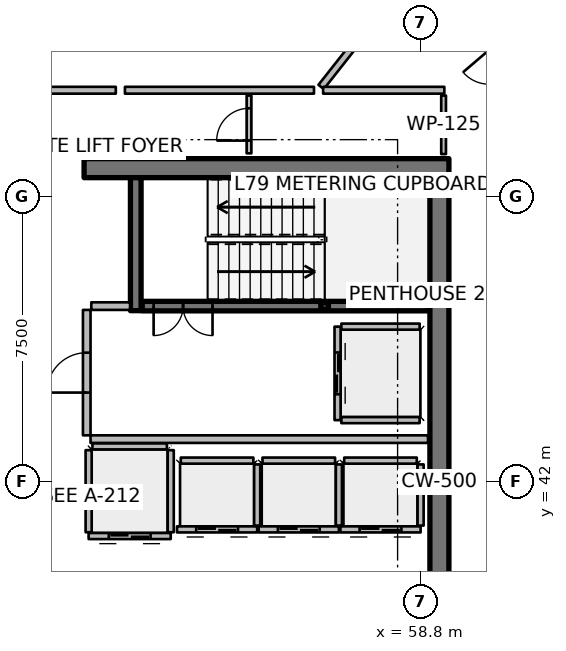
"""IFC4 building model, lengths in metres.
Left out: names, types, materials, properties, quantities, classifications, styles, units other than length and angle.
Written with IfcOpenShell. Run it as: python <this file> out.ifc"""

import sys

from ifc_helpers import new_model, si_unit, direction, frame, frame_2d, origin, origin_2d, place, context, subcontext, project, spatial, rectangle, hollow_rectangle, extrude, element, fill, save


model = new_model("IFC4")
c1 = context("Model", 3, precision=1e-05, world=origin(), true_north=direction((0.0, 1.0)))
c2 = subcontext(c1, "Body", "Model", "MODEL_VIEW")
j1 = project(units=[si_unit("LENGTHUNIT", "METRE"), si_unit("PLANEANGLEUNIT", "RADIAN")], contexts=[c1])
p1 = place(None, origin())
s1 = spatial("IfcSite", under=j1, at=p1, CompositionType="ELEMENT")
p2 = place(p1, origin())
s2 = spatial("IfcBuilding", under=s1, at=p2, CompositionType="ELEMENT")
p3 = place(p2, frame((0.0, 0.0, 313.7)))
s3 = spatial("IfcBuildingStorey", under=s2, at=p3, CompositionType="ELEMENT", Elevation=313.7)
p4 = place(p3, frame((49.95, 50.25, 0.0), z_axis=(0.0, 0.0, 1.0), x_axis=(1.0, 0.0, 0.0)))
e1 = element("IfcWall", 1, at=p4, inside=s3, PredefinedType="SHEAR", context=c2, shape_type="SweptSolid", body=[
    extrude(rectangle(XDim=9.6, YDim=0.5, at=frame_2d((4.8, 0.0))), origin(), (0.0, 0.0, 1.0), 4.2),
])
p5 = place(p3, frame((59.3, 34.0, 0.0), z_axis=(0.0, 0.0, 1.0), x_axis=(0.0, 1.0, 0.0)))
e2 = element("IfcWall", 2, at=p5, inside=s3, PredefinedType="SHEAR", context=c2, shape_type="SweptSolid", body=[
    extrude(rectangle(XDim=16.0, YDim=0.5, at=frame_2d((8.0, 0.0))), origin(), (0.0, 0.0, 1.0), 4.2),
])
p6 = place(p3, frame((51.31, 46.5, 0.0), z_axis=(0.0, 0.0, 1.0), x_axis=(0.0, 1.0, 0.0)))
e3 = element("IfcWall", 3, at=p6, inside=s3, PredefinedType="SHEAR", context=c2, shape_type="SweptSolid", body=[
    extrude(rectangle(XDim=3.5, YDim=0.28, at=frame_2d((1.75, 0.0))), origin(), (0.0, 0.0, 1.0), 4.2),
])
p7 = place(p3, frame((56.28, 46.62, 0.0), z_axis=(0.0, 0.0, 1.0), x_axis=(1.0, 0.0, 0.0)))
e4 = element("IfcColumn", 4, at=p7, inside=s3, PredefinedType="COLUMN", context=c2, shape_type="SweptSolid", body=[
    extrude(hollow_rectangle(XDim=0.2, YDim=0.2, WallThickness=0.01, InnerFilletRadius=0.01, OuterFilletRadius=0.02, at=origin_2d()), origin(), (0.0, 0.0, 1.0), 1.895),
])
p8 = place(p3, frame((51.48, 46.62, 0.0), z_axis=(0.0, 0.0, 1.0), x_axis=(1.0, 0.0, 0.0)))
e5 = element("IfcWall", 5, at=p8, inside=s3, PredefinedType="SOLIDWALL", context=c2, shape_type="SweptSolid", body=[
    extrude(rectangle(XDim=7.54, YDim=0.25, at=frame_2d((3.77, 0.0))), origin(), (0.0, 0.0, 1.0), 3.94),
])
p9 = place(p8, frame((0.3, 0.0, 0.0)))
e6 = element("IfcOpeningElement", 6, at=p9, cuts=e5, PredefinedType="OPENING", context=c2, shape_type="SweptSolid", body=[
    extrude(rectangle(XDim=1.55, YDim=2.15, at=frame_2d((0.775, 1.075))), frame((0.0, 0.135, 0.0), z_axis=(0.0, -1.0, 0.0), x_axis=(1.0, 0.0, 0.0)), (0.0, 0.0, 1.0), 0.27),
])
p10 = place(p3, frame((54.505, 40.745, 0.0), z_axis=(0.0, 0.0, 1.0), x_axis=(-1.0, 0.0, 0.0)))
e7 = element("IfcWall", 7, at=p10, inside=s3, PredefinedType="PARTITIONING", context=c2, shape_type="SweptSolid", body=[
    extrude(rectangle(XDim=2.11, YDim=0.16, at=frame_2d((1.055, 0.0))), origin(), (0.0, 0.0, 1.0), 3.94),
])
p11 = place(p10, frame((0.505, 0.0, 0.0)))
e8 = element("IfcOpeningElement", 8, at=p11, cuts=e7, PredefinedType="OPENING", context=c2, shape_type="SweptSolid", body=[
    extrude(rectangle(XDim=1.1, YDim=2.1, at=frame_2d((0.55, 1.05))), frame((0.0, 0.09, 0.0), z_axis=(0.0, -1.0, 0.0), x_axis=(1.0, 0.0, 0.0)), (0.0, 0.0, 1.0), 0.18),
])
p12 = place(p3, frame((54.505, 40.845, 0.0), z_axis=(0.0, 0.0, 1.0), x_axis=(0.0, 1.0, 0.0)))
e9 = element("IfcWall", 9, at=p12, inside=s3, PredefinedType="PARTITIONING", context=c2, shape_type="SweptSolid", body=[
    extrude(rectangle(XDim=1.61, YDim=0.16, at=frame_2d((0.805, 0.0))), origin(), (0.0, 0.0, 1.0), 3.94),
])
p13 = place(p3, frame((52.495, 42.555, 0.0), z_axis=(0.0, 0.0, 1.0), x_axis=(1.0, 0.0, 0.0)))
e10 = element("IfcWall", 10, at=p13, inside=s3, PredefinedType="PARTITIONING", context=c2, shape_type="SweptSolid", body=[
    extrude(rectangle(XDim=1.91, YDim=0.16, at=frame_2d((0.955, 0.0))), origin(), (0.0, 0.0, 1.0), 3.94),
])
p14 = place(p3, frame((56.655, 40.745, 0.0), z_axis=(0.0, 0.0, 1.0), x_axis=(-1.0, 0.0, 0.0)))
e11 = element("IfcWall", 11, at=p14, inside=s3, PredefinedType="PARTITIONING", context=c2, shape_type="SweptSolid", body=[
    extrude(rectangle(XDim=2.11, YDim=0.16, at=frame_2d((1.055, 0.0))), origin(), (0.0, 0.0, 1.0), 3.94),
])
p15 = place(p14, frame((0.505, 0.0, 0.0)))
e12 = element("IfcOpeningElement", 12, at=p15, cuts=e11, PredefinedType="OPENING", context=c2, shape_type="SweptSolid", body=[
    extrude(rectangle(XDim=1.1, YDim=2.1, at=frame_2d((0.55, 1.05))), frame((0.0, 0.09, 0.0), z_axis=(0.0, -1.0, 0.0), x_axis=(1.0, 0.0, 0.0)), (0.0, 0.0, 1.0), 0.18),
])
p16 = place(p3, frame((56.655, 40.845, 0.0), z_axis=(0.0, 0.0, 1.0), x_axis=(0.0, 1.0, 0.0)))
e13 = element("IfcWall", 13, at=p16, inside=s3, PredefinedType="PARTITIONING", context=c2, shape_type="SweptSolid", body=[
    extrude(rectangle(XDim=1.61, YDim=0.16, at=frame_2d((0.805, 0.0))), origin(), (0.0, 0.0, 1.0), 3.94),
])
p17 = place(p3, frame((54.645, 42.555, 0.0), z_axis=(0.0, 0.0, 1.0), x_axis=(1.0, 0.0, 0.0)))
e14 = element("IfcWall", 14, at=p17, inside=s3, PredefinedType="PARTITIONING", context=c2, shape_type="SweptSolid", body=[
    extrude(rectangle(XDim=1.91, YDim=0.16, at=frame_2d((0.955, 0.0))), origin(), (0.0, 0.0, 1.0), 3.94),
])
p18 = place(p3, frame((58.805, 40.745, 0.0), z_axis=(0.0, 0.0, 1.0), x_axis=(-1.0, 0.0, 0.0)))
e15 = element("IfcWall", 15, at=p18, inside=s3, PredefinedType="PARTITIONING", context=c2, shape_type="SweptSolid", body=[
    extrude(rectangle(XDim=2.11, YDim=0.16, at=frame_2d((1.055, 0.0))), origin(), (0.0, 0.0, 1.0), 3.94),
])
p19 = place(p18, frame((0.505, 0.0, 0.0)))
e16 = element("IfcOpeningElement", 16, at=p19, cuts=e15, PredefinedType="OPENING", context=c2, shape_type="SweptSolid", body=[
    extrude(rectangle(XDim=1.1, YDim=2.1, at=frame_2d((0.55, 1.05))), frame((0.0, 0.09, 0.0), z_axis=(0.0, -1.0, 0.0), x_axis=(1.0, 0.0, 0.0)), (0.0, 0.0, 1.0), 0.18),
])
p20 = place(p3, frame((58.805, 40.845, 0.0), z_axis=(0.0, 0.0, 1.0), x_axis=(0.0, 1.0, 0.0)))
e17 = element("IfcWall", 17, at=p20, inside=s3, PredefinedType="PARTITIONING", context=c2, shape_type="SweptSolid", body=[
    extrude(rectangle(XDim=1.61, YDim=0.16, at=frame_2d((0.805, 0.0))), origin(), (0.0, 0.0, 1.0), 3.94),
])
p21 = place(p3, frame((56.795, 42.555, 0.0), z_axis=(0.0, 0.0, 1.0), x_axis=(1.0, 0.0, 0.0)))
e18 = element("IfcWall", 18, at=p21, inside=s3, PredefinedType="PARTITIONING", context=c2, shape_type="SweptSolid", body=[
    extrude(rectangle(XDim=1.91, YDim=0.16, at=frame_2d((0.955, 0.0))), origin(), (0.0, 0.0, 1.0), 3.94),
])
p22 = place(p3, frame((56.62, 46.08, 0.0), z_axis=(0.0, 0.0, 1.0), x_axis=(0.0, -1.0, 0.0)))
e19 = element("IfcWall", 19, at=p22, inside=s3, PredefinedType="PARTITIONING", context=c2, shape_type="SweptSolid", body=[
    extrude(rectangle(XDim=2.46, YDim=0.16, at=frame_2d((1.23, 0.0))), origin(), (0.0, 0.0, 1.0), 3.94),
])
p23 = place(p22, frame((0.68, 0.0, 0.0)))
e20 = element("IfcOpeningElement", 20, at=p23, cuts=e19, PredefinedType="OPENING", context=c2, shape_type="SweptSolid", body=[
    extrude(rectangle(XDim=1.1, YDim=2.1, at=frame_2d((0.55, 1.05))), frame((0.0, 0.09, 0.0), z_axis=(0.0, -1.0, 0.0), x_axis=(1.0, 0.0, 0.0)), (0.0, 0.0, 1.0), 0.18),
])
for number, where, z_axis, x_axis in (
    (21, (56.72, 46.08, 0.0), (0.0, 0.0, 1.0), (1.0, 0.0, 0.0)),
    (22, (56.72, 43.62, 0.0), (0.0, 0.0, 1.0), (1.0, 0.0, 0.0)),
):
    element("IfcWall", number, at=place(p3, frame(where, z_axis=z_axis, x_axis=x_axis)), inside=s3, PredefinedType="PARTITIONING", context=c2, shape_type="SweptSolid", body=[
        extrude(rectangle(XDim=2.06, YDim=0.16, at=frame_2d((1.03, 0.0))), origin(), (0.0, 0.0, 1.0), 3.94),
    ])
p24 = place(p3, frame((52.23, 40.57, 0.0), z_axis=(0.0, 0.0, 1.0), x_axis=(-1.0, 0.0, 0.0)))
e23 = element("IfcWall", 23, at=p24, inside=s3, PredefinedType="PARTITIONING", context=c2, shape_type="SweptSolid", body=[
    extrude(rectangle(XDim=2.16, YDim=0.16, at=frame_2d((1.08, 0.0))), origin(), (0.0, 0.0, 1.0), 3.94),
])
p25 = place(p24, frame((0.53, 0.0, 0.0)))
e24 = element("IfcOpeningElement", 24, at=p25, cuts=e23, PredefinedType="OPENING", context=c2, shape_type="SweptSolid", body=[
    extrude(rectangle(XDim=1.1, YDim=2.1, at=frame_2d((0.55, 1.05))), frame((0.0, 0.09, 0.0), z_axis=(0.0, -1.0, 0.0), x_axis=(1.0, 0.0, 0.0)), (0.0, 0.0, 1.0), 0.18),
])
for number, where, z_axis, x_axis in (
    (25, (52.23, 40.67, 0.0), (0.0, 0.0, 1.0), (0.0, 1.0, 0.0)),
    (26, (50.07, 40.67, 0.0), (0.0, 0.0, 1.0), (0.0, 1.0, 0.0)),
):
    element("IfcWall", number, at=place(p3, frame(where, z_axis=z_axis, x_axis=x_axis)), inside=s3, PredefinedType="PARTITIONING", context=c2, shape_type="SweptSolid", body=[
        extrude(rectangle(XDim=2.16, YDim=0.16, at=frame_2d((1.08, 0.0))), origin(), (0.0, 0.0, 1.0), 3.94),
    ])
p26 = place(p3, frame((50.17, 42.93, 0.0), z_axis=(0.0, 0.0, 1.0), x_axis=(1.0, 0.0, 0.0)))
e27 = element("IfcWall", 27, at=p26, inside=s3, PredefinedType="PARTITIONING", context=c2, shape_type="SweptSolid", body=[
    extrude(rectangle(XDim=1.96, YDim=0.16, at=frame_2d((0.98, 0.0))), origin(), (0.0, 0.0, 1.0), 3.94),
])
p27 = place(p3, frame((50.12, 43.12, 0.0), z_axis=(0.0, 0.0, 1.0), x_axis=(1.0, 0.0, 0.0)))
e28 = element("IfcWall", 28, at=p27, inside=s3, PredefinedType="PARTITIONING", context=c2, shape_type="SweptSolid", body=[
    extrude(rectangle(XDim=8.88, YDim=0.2, at=frame_2d((4.44, 0.0))), origin(), (0.0, 0.0, 1.0), 3.94),
])
p28 = place(p3, frame((50.14, 46.62, 0.0), z_axis=(0.0, 0.0, 1.0), x_axis=(1.0, 0.0, 0.0)))
e29 = element("IfcWall", 29, at=p28, inside=s3, PredefinedType="PARTITIONING", context=c2, shape_type="SweptSolid", body=[
    extrude(rectangle(XDim=1.02, YDim=0.2, at=frame_2d((0.51, 0.0))), origin(), (0.0, 0.0, 1.0), 3.94),
])
p29 = place(p3, frame((50.02, 43.22, 0.0), z_axis=(0.0, 0.0, 1.0), x_axis=(0.0, 1.0, 0.0)))
e30 = element("IfcWall", 30, at=p29, inside=s3, PredefinedType="PARTITIONING", context=c2, shape_type="SweptSolid", body=[
    extrude(rectangle(XDim=3.3, YDim=0.2, at=frame_2d((1.65, 0.0))), origin(), (0.0, 0.0, 1.0), 3.94),
])
p30 = place(p29, frame((1.125, 0.0, 0.0)))
e31 = element("IfcOpeningElement", 31, at=p30, cuts=e30, PredefinedType="OPENING", context=c2, shape_type="SweptSolid", body=[
    extrude(rectangle(XDim=1.05, YDim=2.1, at=frame_2d((0.525, 1.05))), frame((0.0, 0.11, 0.0), z_axis=(0.0, -1.0, 0.0), x_axis=(1.0, 0.0, 0.0)), (0.0, 0.0, 1.0), 0.22),
])
p31 = place(p3, frame((59.41, 50.62, 0.0), z_axis=(0.0, 0.0, 1.0), x_axis=(0.0, 1.0, 0.0)))
e32 = element("IfcWall", 32, at=p31, inside=s3, PredefinedType="PARTITIONING", context=c2, shape_type="SweptSolid", body=[
    extrude(rectangle(XDim=1.54, YDim=0.125, at=frame_2d((0.77, 0.0))), origin(), (0.0, 0.0, 1.0), 3.38),
])
p32 = place(p3, frame((54.29, 50.64, 0.0), z_axis=(0.0, 0.0, 1.0), x_axis=(0.0, 1.0, 0.0)))
e33 = element("IfcWall", 33, at=p32, inside=s3, PredefinedType="PARTITIONING", context=c2, shape_type="SweptSolid", body=[
    extrude(rectangle(XDim=1.52, YDim=0.125, at=frame_2d((0.76, 0.0))), origin(), (0.0, 0.0, 1.0), 3.38),
])
p33 = place(p32, frame((0.335, 0.0, 0.0)))
e34 = element("IfcOpeningElement", 34, at=p33, cuts=e33, PredefinedType="OPENING", context=c2, shape_type="SweptSolid", body=[
    extrude(rectangle(XDim=0.85, YDim=2.06, at=frame_2d((0.425, 1.03))), frame((0.0, 0.073, 0.0), z_axis=(0.0, -1.0, 0.0), x_axis=(1.0, 0.0, 0.0)), (0.0, 0.0, 1.0), 0.145),
])
p34 = place(p3, frame((56.188, 52.386, 0.0), z_axis=(0.0, 0.0, 1.0), x_axis=(0.619092742501, 0.78531788225, 0.0)))
e35 = element("IfcWall", 35, at=p34, inside=s3, PredefinedType="PARTITIONING", context=c2, shape_type="SweptSolid", body=[
    extrude(rectangle(XDim=11.901, YDim=0.18, at=frame_2d((5.951, 0.0))), origin(), (0.0, 0.0, 1.0), 3.38),
])
p35 = place(p3, frame((56.0, 52.3, 0.0), z_axis=(0.0, 0.0, 1.0), x_axis=(-1.0, 0.0, 0.0)))
e36 = element("IfcWall", 36, at=p35, inside=s3, PredefinedType="PARTITIONING", context=c2, shape_type="SweptSolid", body=[
    extrude(rectangle(XDim=4.975, YDim=0.18, at=frame_2d((2.488, 0.0))), origin(), (0.0, 0.0, 1.0), 3.38),
])
p36 = place(p3, frame((50.785, 52.3, 0.0), z_axis=(0.0, 0.0, 1.0), x_axis=(-1.0, 0.0, 0.0)))
e37 = element("IfcWall", 37, at=p36, inside=s3, PredefinedType="PARTITIONING", context=c2, shape_type="SweptSolid", body=[
    extrude(rectangle(XDim=3.884, YDim=0.18, at=frame_2d((1.942, 0.0))), origin(), (0.0, 0.0, 1.0), 3.38),
])
p37 = place(p3, frame((59.43, 52.3, 0.0), z_axis=(0.0, 0.0, 1.0), x_axis=(-1.0, 0.0, 0.0)))
e38 = element("IfcWall", 38, at=p37, inside=s3, PredefinedType="PARTITIONING", context=c2, shape_type="SweptSolid", body=[
    extrude(rectangle(XDim=3.19, YDim=0.18, at=frame_2d((1.595, 0.0))), origin(), (0.0, 0.0, 1.0), 3.38),
])
p38 = place(p3, frame((63.019, 50.535, 0.0), z_axis=(0.0, 0.0, 1.0), x_axis=(-0.649450715324, 0.760403687764, 0.0)))
e39 = element("IfcWall", 39, at=p38, inside=s3, PredefinedType="PARTITIONING", context=c2, shape_type="SweptSolid", body=[
    extrude(rectangle(XDim=6.529, YDim=0.125, at=frame_2d((3.264, 0.0))), origin(), (0.0, 0.0, 1.0), 3.38),
])
p39 = place(p38, frame((2.814, 0.0, 0.0)))
e40 = element("IfcOpeningElement", 40, at=p39, cuts=e39, PredefinedType="OPENING", context=c2, shape_type="SweptSolid", body=[
    extrude(rectangle(XDim=0.9, YDim=2.08, at=frame_2d((0.45, 1.04))), frame((0.0, 0.073, 0.0), z_axis=(0.0, -1.0, 0.0), x_axis=(1.0, 0.0, 0.0)), (0.0, 0.0, 1.0), 0.145),
])
p40 = place(p3, frame((65.467, 51.906, 0.0), z_axis=(0.0, 0.0, 1.0), x_axis=(-0.649439942486, 0.760412888571, 0.0)))
e41 = element("IfcWall", 41, at=p40, inside=s3, PredefinedType="PARTITIONING", context=c2, shape_type="SweptSolid", body=[
    extrude(rectangle(XDim=7.623, YDim=0.125, at=frame_2d((3.812, 0.0))), origin(), (0.0, 0.0, 1.0), 3.38),
])
p41 = place(p40, frame((3.362, 0.0, 0.0)))
e42 = element("IfcOpeningElement", 42, at=p41, cuts=e41, PredefinedType="OPENING", context=c2, shape_type="SweptSolid", body=[
    extrude(rectangle(XDim=0.9, YDim=2.08, at=frame_2d((0.45, 1.04))), frame((0.0, 0.073, 0.0), z_axis=(0.0, -1.0, 0.0), x_axis=(1.0, 0.0, 0.0)), (0.0, 0.0, 1.0), 0.145),
])
p42 = place(p9, origin())
e43 = element("IfcDoor", 43, at=p42, inside=s3, OperationType="DOUBLE_DOOR_SINGLE_SWING", PredefinedType="DOOR", context=c2, shape_type="SweptSolid", body=[
    extrude(rectangle(XDim=1.55, YDim=2.15, at=frame_2d((0.775, 1.075))), frame((0.0, 0.025, 0.0), z_axis=(0.0, -1.0, 0.0), x_axis=(1.0, 0.0, 0.0)), (0.0, 0.0, 1.0), 0.05),
])
fill(e6, e43)
p43 = place(p11, origin())
e44 = element("IfcDoor", 44, at=p43, inside=s3, OperationType="DOUBLE_DOOR_SLIDING", PredefinedType="DOOR", context=c2, shape_type="SweptSolid", body=[
    extrude(rectangle(XDim=1.1, YDim=2.1, at=frame_2d((0.55, 1.05))), frame((0.0, 0.025, 0.0), z_axis=(0.0, -1.0, 0.0), x_axis=(1.0, 0.0, 0.0)), (0.0, 0.0, 1.0), 0.05),
])
fill(e8, e44)
p44 = place(p15, origin())
e45 = element("IfcDoor", 45, at=p44, inside=s3, OperationType="DOUBLE_DOOR_SLIDING", PredefinedType="DOOR", context=c2, shape_type="SweptSolid", body=[
    extrude(rectangle(XDim=1.1, YDim=2.1, at=frame_2d((0.55, 1.05))), frame((0.0, 0.025, 0.0), z_axis=(0.0, -1.0, 0.0), x_axis=(1.0, 0.0, 0.0)), (0.0, 0.0, 1.0), 0.05),
])
fill(e12, e45)
p45 = place(p19, origin())
e46 = element("IfcDoor", 46, at=p45, inside=s3, OperationType="DOUBLE_DOOR_SLIDING", PredefinedType="DOOR", context=c2, shape_type="SweptSolid", body=[
    extrude(rectangle(XDim=1.1, YDim=2.1, at=frame_2d((0.55, 1.05))), frame((0.0, 0.025, 0.0), z_axis=(0.0, -1.0, 0.0), x_axis=(1.0, 0.0, 0.0)), (0.0, 0.0, 1.0), 0.05),
])
fill(e16, e46)
p46 = place(p23, origin())
e47 = element("IfcDoor", 47, at=p46, inside=s3, OperationType="DOUBLE_DOOR_SLIDING", PredefinedType="DOOR", context=c2, shape_type="SweptSolid", body=[
    extrude(rectangle(XDim=1.1, YDim=2.1, at=frame_2d((0.55, 1.05))), frame((0.0, 0.025, 0.0), z_axis=(0.0, -1.0, 0.0), x_axis=(1.0, 0.0, 0.0)), (0.0, 0.0, 1.0), 0.05),
])
fill(e20, e47)
p47 = place(p25, origin())
e48 = element("IfcDoor", 48, at=p47, inside=s3, OperationType="DOUBLE_DOOR_SLIDING", PredefinedType="DOOR", context=c2, shape_type="SweptSolid", body=[
    extrude(rectangle(XDim=1.1, YDim=2.1, at=frame_2d((0.55, 1.05))), frame((0.0, 0.025, 0.0), z_axis=(0.0, -1.0, 0.0), x_axis=(1.0, 0.0, 0.0)), (0.0, 0.0, 1.0), 0.05),
])
fill(e24, e48)
p48 = place(p30, origin())
e49 = element("IfcDoor", 49, at=p48, inside=s3, OperationType="SINGLE_SWING_LEFT", PredefinedType="DOOR", context=c2, shape_type="SweptSolid", body=[
    extrude(rectangle(XDim=1.05, YDim=2.1, at=frame_2d((0.525, 1.05))), frame((0.0, 0.025, 0.0), z_axis=(0.0, -1.0, 0.0), x_axis=(1.0, 0.0, 0.0)), (0.0, 0.0, 1.0), 0.05),
])
fill(e31, e49)
p49 = place(p33, origin())
e50 = element("IfcDoor", 50, at=p49, inside=s3, OperationType="SINGLE_SWING_LEFT", PredefinedType="DOOR", context=c2, shape_type="SweptSolid", body=[
    extrude(rectangle(XDim=0.85, YDim=2.06, at=frame_2d((0.425, 1.03))), frame((0.0, 0.025, 0.0), z_axis=(0.0, -1.0, 0.0), x_axis=(1.0, 0.0, 0.0)), (0.0, 0.0, 1.0), 0.05),
])
fill(e34, e50)
save(model, sys.argv[1])
